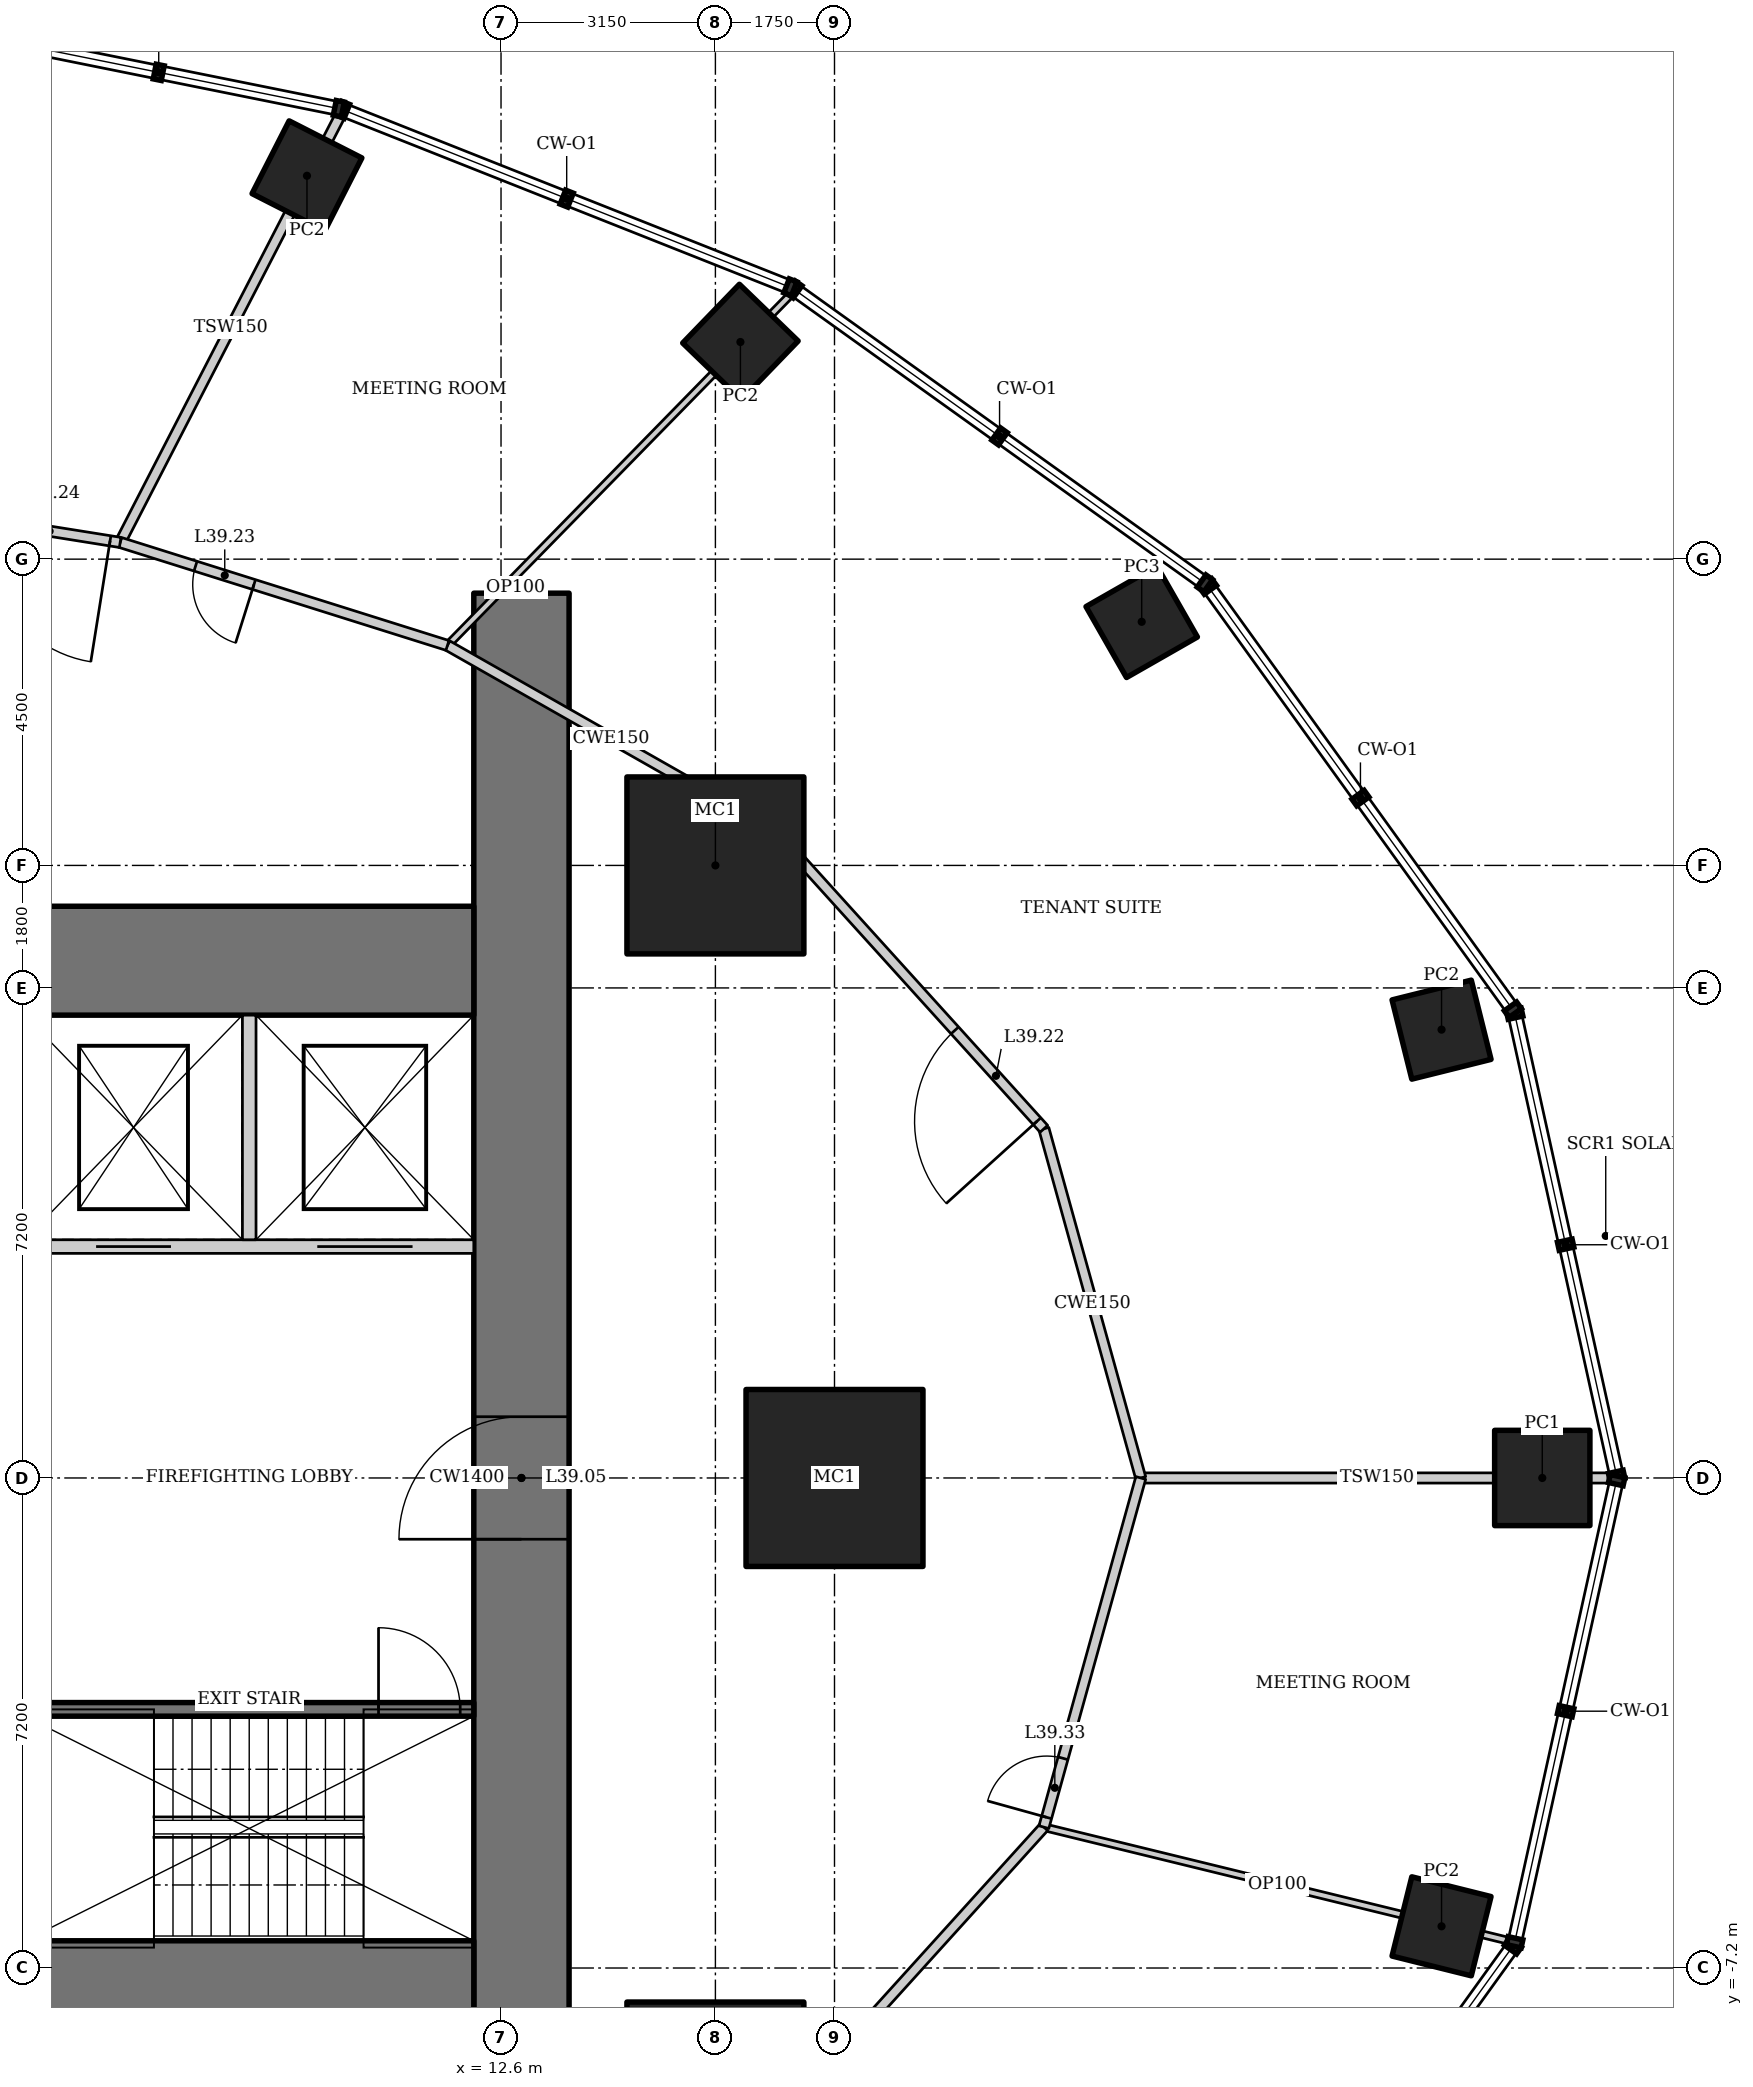
"""IFC4 building model, lengths in metres.
Left out: names, types, materials, properties, quantities, classifications, styles, units other than length and angle.
Written with IfcOpenShell. Run it as: python <this file> out.ifc"""

import sys

from ifc_helpers import new_model, si_unit, direction, frame, frame_2d, origin, origin_2d, place, context, subcontext, project, spatial, rectangle, hollow_rectangle, extrude, element, fill, save


model = new_model("IFC4")
c1 = context("Model", 3, precision=1e-05, world=origin(), true_north=direction((0.0, 1.0)))
c2 = subcontext(c1, "Body", "Model", "MODEL_VIEW")
j1 = project(units=[si_unit("LENGTHUNIT", "METRE"), si_unit("PLANEANGLEUNIT", "RADIAN")], contexts=[c1])
p1 = place(None, origin())
s1 = spatial("IfcSite", under=j1, at=p1, CompositionType="ELEMENT")
p2 = place(p1, origin())
s2 = spatial("IfcBuilding", under=s1, at=p2, CompositionType="ELEMENT")
p3 = place(p2, frame((0.0, 0.0, 167.8)))
s3 = spatial("IfcBuildingStorey", under=s2, at=p3, CompositionType="ELEMENT", Elevation=167.8)
for number, where, z_axis, x_axis in (
    (1, (17.5, 0.0, 0.0), (0.0, 0.0, 1.0), (1.0, 0.0, 0.0)),
    (2, (15.75, 9.0, 0.0), (0.0, 0.0, 1.0), (1.0, 0.0, 0.0)),
    (3, (15.75, -9.0, 0.0), (0.0, 0.0, 1.0), (1.0, 0.0, 0.0)),
):
    element("IfcColumn", number, at=place(p3, frame(where, z_axis=z_axis, x_axis=x_axis)), inside=s3, PredefinedType="COLUMN", context=c2, shape_type="SweptSolid", body=[
        extrude(hollow_rectangle(XDim=2.6, YDim=2.6, WallThickness=0.13, at=origin_2d()), origin(), (0.0, 0.0, 1.0), 4.2),
    ])
p4 = place(p3, frame((27.9, 0.0, 0.0), z_axis=(0.0, 0.0, 1.0), x_axis=(1.0, 0.0, 0.0)))
e4 = element("IfcColumn", 4, at=p4, inside=s3, PredefinedType="COLUMN", context=c2, shape_type="SweptSolid", body=[
    extrude(hollow_rectangle(XDim=1.4, YDim=1.4, WallThickness=0.1, at=origin_2d()), origin(), (0.0, 0.0, 1.0), 4.2),
])
p5 = place(p3, frame((26.42, 6.587, 0.0), z_axis=(0.0, 0.0, 1.0), x_axis=(0.970295726276, 0.2419218956, 0.0)))
e5 = element("IfcColumn", 5, at=p5, inside=s3, PredefinedType="COLUMN", context=c2, shape_type="SweptSolid", body=[
    extrude(hollow_rectangle(XDim=1.2, YDim=1.2, WallThickness=0.1, at=origin_2d()), origin(), (0.0, 0.0, 1.0), 4.2),
])
p6 = place(p3, frame((22.014, 12.579, 0.0), z_axis=(0.0, 0.0, 1.0), x_axis=(0.86824298017, 0.496139221777, 0.0)))
e6 = element("IfcColumn", 6, at=p6, inside=s3, PredefinedType="COLUMN", context=c2, shape_type="SweptSolid", body=[
    extrude(hollow_rectangle(XDim=1.2, YDim=1.2, WallThickness=0.12, at=origin_2d()), origin(), (0.0, 0.0, 1.0), 4.2),
])
for number, where, z_axis, x_axis in (
    (7, (16.118, 16.69, 0.0), (0.0, 0.0, 1.0), (0.695, 0.719, 0.0)),
    (8, (9.749, 19.133, 0.0), (0.0, 0.0, 1.0), (0.454, 0.891, 0.0)),
    (9, (26.42, -6.587, 0.0), (0.0, 0.0, 1.0), (0.242, 0.97, 0.0)),
):
    element("IfcColumn", number, at=place(p3, frame(where, z_axis=z_axis, x_axis=x_axis)), inside=s3, PredefinedType="COLUMN", context=c2, shape_type="SweptSolid", body=[
        extrude(hollow_rectangle(XDim=1.2, YDim=1.2, WallThickness=0.1, at=origin_2d()), origin(), (0.0, 0.0, 1.0), 4.2),
    ])
p7 = place(p3, frame((12.9, -13.0, 0.0), z_axis=(0.0, 0.0, 1.0), x_axis=(0.0, 1.0, 0.0)))
e10 = element("IfcWall", 10, at=p7, inside=s3, PredefinedType="SHEAR", context=c2, shape_type="SweptSolid", body=[
    extrude(rectangle(XDim=26.0, YDim=1.4, at=frame_2d((13.0, 0.0))), origin(), (0.0, 0.0, 1.0), 4.2),
])
p8 = place(p7, frame((12.1, 0.0, 0.0)))
e11 = element("IfcOpeningElement", 11, at=p8, cuts=e10, PredefinedType="OPENING", context=c2, shape_type="SweptSolid", body=[
    extrude(rectangle(XDim=1.8, YDim=2.1, at=frame_2d((0.9, 1.05))), frame((0.0, 0.71, 0.0), z_axis=(0.0, -1.0, 0.0), x_axis=(1.0, 0.0, 0.0)), (0.0, 0.0, 1.0), 1.42),
])
for number, where, z_axis, x_axis in (
    (12, (-12.2, -7.6, 0.0), (0.0, 0.0, 1.0), (1.0, 0.0, 0.0)),
    (13, (12.2, 7.6, 0.0), (0.0, 0.0, 1.0), (-1.0, 0.0, 0.0)),
):
    element("IfcWall", number, at=place(p3, frame(where, z_axis=z_axis, x_axis=x_axis)), inside=s3, PredefinedType="SHEAR", context=c2, shape_type="SweptSolid", body=[
        extrude(rectangle(XDim=24.4, YDim=1.6, at=frame_2d((12.2, 0.0))), origin(), (0.0, 0.0, 1.0), 4.2),
    ])
p9 = place(p3, frame((5.6, -3.4, 0.0), z_axis=(0.0, 0.0, 1.0), x_axis=(1.0, 0.0, 0.0)))
e14 = element("IfcWall", 14, at=p9, inside=s3, PredefinedType="SHEAR", context=c2, shape_type="SweptSolid", body=[
    extrude(rectangle(XDim=6.6, YDim=0.2, at=frame_2d((3.3, 0.0))), origin(), (0.0, 0.0, 1.0), 4.2),
])
p10 = place(p9, frame((5.2, 0.0, 0.0)))
e15 = element("IfcOpeningElement", 15, at=p10, cuts=e14, PredefinedType="OPENING", context=c2, shape_type="SweptSolid", body=[
    extrude(rectangle(XDim=1.2, YDim=2.1, at=frame_2d((0.6, 1.05))), frame((0.0, 0.11, 0.0), z_axis=(0.0, -1.0, 0.0), x_axis=(1.0, 0.0, 0.0)), (0.0, 0.0, 1.0), 0.22),
])
p11 = place(p3, frame((12.2, 3.4, 0.0), z_axis=(0.0, 0.0, 1.0), x_axis=(-1.0, 0.0, 0.0)))
e16 = element("IfcWall", 16, at=p11, inside=s3, PredefinedType="SOLIDWALL", context=c2, shape_type="SweptSolid", body=[
    extrude(rectangle(XDim=6.6, YDim=0.2, at=frame_2d((3.3, 0.0))), origin(), (0.0, 0.0, 1.0), 4.2),
])
p12 = place(p11, frame((4.45, 0.0, 0.0)))
e17 = element("IfcOpeningElement", 17, at=p12, cuts=e16, PredefinedType="OPENING", context=c2, shape_type="SweptSolid", body=[
    extrude(rectangle(XDim=1.1, YDim=2.2, at=frame_2d((0.55, 1.1))), frame((0.0, 0.11, 0.0), z_axis=(0.0, -1.0, 0.0), x_axis=(1.0, 0.0, 0.0)), (0.0, 0.0, 1.0), 0.22),
])
p13 = place(p11, frame((0.9, 0.0, 0.0)))
e18 = element("IfcOpeningElement", 18, at=p13, cuts=e16, PredefinedType="OPENING", context=c2, shape_type="SweptSolid", body=[
    extrude(rectangle(XDim=1.4, YDim=2.2, at=frame_2d((0.7, 1.1))), frame((0.0, 0.11, 0.0), z_axis=(0.0, -1.0, 0.0), x_axis=(1.0, 0.0, 0.0)), (0.0, 0.0, 1.0), 0.22),
])
p14 = place(p3, frame((8.9, 3.5, 0.0), z_axis=(0.0, 0.0, 1.0), x_axis=(0.0, 1.0, 0.0)))
e19 = element("IfcWall", 19, at=p14, inside=s3, PredefinedType="SOLIDWALL", context=c2, shape_type="SweptSolid", body=[
    extrude(rectangle(XDim=3.3, YDim=0.2, at=frame_2d((1.65, 0.0))), origin(), (0.0, 0.0, 1.0), 4.2),
])
p15 = place(p3, frame((28.944, 0.0, 0.0), z_axis=(0.0, 0.0, 1.0), x_axis=(-1.0, 0.0, 0.0)))
e20 = element("IfcWall", 20, at=p15, inside=s3, PredefinedType="PARTITIONING", context=c2, shape_type="SweptSolid", body=[
    extrude(rectangle(XDim=6.944, YDim=0.15, at=frame_2d((3.472, 0.0))), origin(), (0.0, 0.0, 1.0), 3.204),
])
p16 = place(p3, frame((16.882, 17.414, 0.0), z_axis=(0.0, 0.0, 1.0), x_axis=(-0.699352142517, -0.714777294517, 0.0)))
e21 = element("IfcWall", 21, at=p16, inside=s3, PredefinedType="PARTITIONING", context=c2, shape_type="SweptSolid", body=[
    extrude(rectangle(XDim=7.249, YDim=0.1, at=frame_2d((3.625, 0.0))), origin(), (0.0, 0.0, 1.0), 3.321),
])
p17 = place(p3, frame((10.253, 20.052, 0.0), z_axis=(0.0, 0.0, 1.0), x_axis=(-0.458082677592, -0.888909590729, 0.0)))
e22 = element("IfcWall", 22, at=p17, inside=s3, PredefinedType="PARTITIONING", context=c2, shape_type="SweptSolid", body=[
    extrude(rectangle(XDim=7.094, YDim=0.15, at=frame_2d((3.547, 0.0))), origin(), (0.0, 0.0, 1.0), 3.349),
])
p18 = place(p3, frame((27.441, -6.809, 0.0), z_axis=(0.0, 0.0, 1.0), x_axis=(-0.971377572955, 0.237540755996, 0.0)))
e23 = element("IfcWall", 23, at=p18, inside=s3, PredefinedType="PARTITIONING", context=c2, shape_type="SweptSolid", body=[
    extrude(rectangle(XDim=7.066, YDim=0.1, at=frame_2d((3.533, 0.0))), origin(), (0.0, 0.0, 1.0), 3.113),
])
p19 = place(p3, frame((22.0, 0.0, 0.0), z_axis=(0.0, 0.0, 1.0), x_axis=(-0.267293817428, 0.963615076244, 0.0)))
e24 = element("IfcWall", 24, at=p19, inside=s3, PredefinedType="PARTITIONING", context=c2, shape_type="SweptSolid", body=[
    extrude(rectangle(XDim=5.324, YDim=0.15, at=frame_2d((2.662, 0.0))), origin(), (0.0, 0.0, 1.0), 4.05),
])
p20 = place(p3, frame((20.577, 5.13, 0.0), z_axis=(0.0, 0.0, 1.0), x_axis=(-0.671118353743, 0.741350224435, 0.0)))
e25 = element("IfcWall", 25, at=p20, inside=s3, PredefinedType="PARTITIONING", context=c2, shape_type="SweptSolid", body=[
    extrude(rectangle(XDim=5.892, YDim=0.15, at=frame_2d((2.946, 0.0))), origin(), (0.0, 0.0, 1.0), 4.05),
])
p21 = place(p20, frame((0.15, 0.0, 0.0)))
e26 = element("IfcOpeningElement", 26, at=p21, cuts=e25, PredefinedType="OPENING", context=c2, shape_type="SweptSolid", body=[
    extrude(rectangle(XDim=1.8, YDim=2.1, at=frame_2d((0.9, 1.05))), frame((0.0, 0.085, 0.0), z_axis=(0.0, -1.0, 0.0), x_axis=(1.0, 0.0, 0.0)), (0.0, 0.0, 1.0), 0.17),
])
p22 = place(p3, frame((16.623, 9.499, 0.0), z_axis=(0.0, 0.0, 1.0), x_axis=(-0.869375991036, 0.494151177485, 0.0)))
e27 = element("IfcWall", 27, at=p22, inside=s3, PredefinedType="PARTITIONING", context=c2, shape_type="SweptSolid", body=[
    extrude(rectangle(XDim=5.532, YDim=0.15, at=frame_2d((2.766, 0.0))), origin(), (0.0, 0.0, 1.0), 4.05),
])
p23 = place(p3, frame((11.813, 12.232, 0.0), z_axis=(0.0, 0.0, 1.0), x_axis=(-0.953893934057, 0.300143903101, 0.0)))
e28 = element("IfcWall", 28, at=p23, inside=s3, PredefinedType="PARTITIONING", context=c2, shape_type="SweptSolid", body=[
    extrude(rectangle(XDim=5.042, YDim=0.15, at=frame_2d((2.521, 0.0))), origin(), (0.0, 0.0, 1.0), 4.05),
])
p24 = place(p23, frame((2.98, 0.0, 0.0)))
e29 = element("IfcOpeningElement", 29, at=p24, cuts=e28, PredefinedType="OPENING", context=c2, shape_type="SweptSolid", body=[
    extrude(rectangle(XDim=0.9, YDim=2.1, at=frame_2d((0.45, 1.05))), frame((0.0, 0.085, 0.0), z_axis=(0.0, -1.0, 0.0), x_axis=(1.0, 0.0, 0.0)), (0.0, 0.0, 1.0), 0.17),
])
p25 = place(p3, frame((7.004, 13.746, 0.0), z_axis=(0.0, 0.0, 1.0), x_axis=(-0.987511396594, 0.157547585181, 0.0)))
e30 = element("IfcWall", 30, at=p25, inside=s3, PredefinedType="PARTITIONING", context=c2, shape_type="SweptSolid", body=[
    extrude(rectangle(XDim=3.741, YDim=0.15, at=frame_2d((1.87, 0.0))), origin(), (0.0, 0.0, 1.0), 4.05),
])
p26 = place(p25, frame((0.15, 0.0, 0.0)))
e31 = element("IfcOpeningElement", 31, at=p26, cuts=e30, PredefinedType="OPENING", context=c2, shape_type="SweptSolid", body=[
    extrude(rectangle(XDim=1.8, YDim=2.1, at=frame_2d((0.9, 1.05))), frame((0.0, 0.085, 0.0), z_axis=(0.0, -1.0, 0.0), x_axis=(1.0, 0.0, 0.0)), (0.0, 0.0, 1.0), 0.17),
])
p27 = place(p3, frame((16.623, -9.499, 0.0), z_axis=(0.0, 0.0, 1.0), x_axis=(0.671118353743, 0.741350224435, 0.0)))
e32 = element("IfcWall", 32, at=p27, inside=s3, PredefinedType="PARTITIONING", context=c2, shape_type="SweptSolid", body=[
    extrude(rectangle(XDim=5.892, YDim=0.15, at=frame_2d((2.946, 0.0))), origin(), (0.0, 0.0, 1.0), 4.05),
])
p28 = place(p3, frame((20.577, -5.13, 0.0), z_axis=(0.0, 0.0, 1.0), x_axis=(0.267293817428, 0.963615076244, 0.0)))
e33 = element("IfcWall", 33, at=p28, inside=s3, PredefinedType="PARTITIONING", context=c2, shape_type="SweptSolid", body=[
    extrude(rectangle(XDim=5.324, YDim=0.15, at=frame_2d((2.662, 0.0))), origin(), (0.0, 0.0, 1.0), 4.05),
])
p29 = place(p28, frame((0.15, 0.0, 0.0)))
e34 = element("IfcOpeningElement", 34, at=p29, cuts=e33, PredefinedType="OPENING", context=c2, shape_type="SweptSolid", body=[
    extrude(rectangle(XDim=0.9, YDim=2.1, at=frame_2d((0.45, 1.05))), frame((0.0, 0.085, 0.0), z_axis=(0.0, -1.0, 0.0), x_axis=(1.0, 0.0, 0.0)), (0.0, 0.0, 1.0), 0.17),
])
p30 = place(p3, frame((12.9, 13.0, 0.0), z_axis=(0.0, 0.0, 1.0), x_axis=(-0.714690391061, 0.699440951707, 0.0)))
e35 = element("IfcWall", 35, at=p30, inside=s3, PredefinedType="PARTITIONING", context=c2, shape_type="SweptSolid", body=[
    extrude(rectangle(XDim=0.24, YDim=0.1, at=frame_2d((0.12, 0.0))), origin(), (0.0, 0.0, 1.0), 4.05),
])
p31 = place(p10, origin())
e36 = element("IfcDoor", 36, at=p31, inside=s3, OperationType="SINGLE_SWING_RIGHT", PredefinedType="DOOR", context=c2, shape_type="SweptSolid", body=[
    extrude(rectangle(XDim=1.2, YDim=2.1, at=frame_2d((0.6, 1.05))), frame((0.0, 0.025, 0.0), z_axis=(0.0, -1.0, 0.0), x_axis=(1.0, 0.0, 0.0)), (0.0, 0.0, 1.0), 0.05),
])
fill(e15, e36)
p32 = place(p8, origin())
e37 = element("IfcDoor", 37, at=p32, inside=s3, OperationType="DOUBLE_DOOR_DOUBLE_SWING", PredefinedType="DOOR", context=c2, shape_type="SweptSolid", body=[
    extrude(rectangle(XDim=1.8, YDim=2.1, at=frame_2d((0.9, 1.05))), frame((0.0, 0.025, 0.0), z_axis=(0.0, -1.0, 0.0), x_axis=(1.0, 0.0, 0.0)), (0.0, 0.0, 1.0), 0.05),
])
fill(e11, e37)
p33 = place(p12, origin())
e38 = element("IfcDoor", 38, at=p33, inside=s3, OperationType="DOUBLE_DOOR_SLIDING", PredefinedType="DOOR", context=c2, shape_type="SweptSolid", body=[
    extrude(rectangle(XDim=1.1, YDim=2.2, at=frame_2d((0.55, 1.1))), frame((0.0, 0.025, 0.0), z_axis=(0.0, -1.0, 0.0), x_axis=(1.0, 0.0, 0.0)), (0.0, 0.0, 1.0), 0.05),
])
fill(e17, e38)
p34 = place(p13, origin())
e39 = element("IfcDoor", 39, at=p34, inside=s3, OperationType="DOUBLE_DOOR_SLIDING", PredefinedType="DOOR", context=c2, shape_type="SweptSolid", body=[
    extrude(rectangle(XDim=1.4, YDim=2.2, at=frame_2d((0.7, 1.1))), frame((0.0, 0.025, 0.0), z_axis=(0.0, -1.0, 0.0), x_axis=(1.0, 0.0, 0.0)), (0.0, 0.0, 1.0), 0.05),
])
fill(e18, e39)
p35 = place(p21, origin())
e40 = element("IfcDoor", 40, at=p35, inside=s3, OperationType="DOUBLE_DOOR_DOUBLE_SWING", PredefinedType="DOOR", context=c2, shape_type="SweptSolid", body=[
    extrude(rectangle(XDim=1.8, YDim=2.1, at=frame_2d((0.9, 1.05))), frame((0.0, 0.025, 0.0), z_axis=(0.0, -1.0, 0.0), x_axis=(1.0, 0.0, 0.0)), (0.0, 0.0, 1.0), 0.05),
])
fill(e26, e40)
p36 = place(p24, origin())
e41 = element("IfcDoor", 41, at=p36, inside=s3, OperationType="SINGLE_SWING_LEFT", PredefinedType="DOOR", context=c2, shape_type="SweptSolid", body=[
    extrude(rectangle(XDim=0.9, YDim=2.1, at=frame_2d((0.45, 1.05))), frame((0.0, 0.025, 0.0), z_axis=(0.0, -1.0, 0.0), x_axis=(1.0, 0.0, 0.0)), (0.0, 0.0, 1.0), 0.05),
])
fill(e29, e41)
p37 = place(p26, origin())
e42 = element("IfcDoor", 42, at=p37, inside=s3, OperationType="DOUBLE_DOOR_DOUBLE_SWING", PredefinedType="DOOR", context=c2, shape_type="SweptSolid", body=[
    extrude(rectangle(XDim=1.8, YDim=2.1, at=frame_2d((0.9, 1.05))), frame((0.0, 0.025, 0.0), z_axis=(0.0, -1.0, 0.0), x_axis=(1.0, 0.0, 0.0)), (0.0, 0.0, 1.0), 0.05),
])
fill(e31, e42)
p38 = place(p29, origin())
e43 = element("IfcDoor", 43, at=p38, inside=s3, OperationType="SINGLE_SWING_LEFT", PredefinedType="DOOR", context=c2, shape_type="SweptSolid", body=[
    extrude(rectangle(XDim=0.9, YDim=2.1, at=frame_2d((0.45, 1.05))), frame((0.0, 0.025, 0.0), z_axis=(0.0, -1.0, 0.0), x_axis=(1.0, 0.0, 0.0)), (0.0, 0.0, 1.0), 0.05),
])
fill(e34, e43)
save(model, sys.argv[1])
